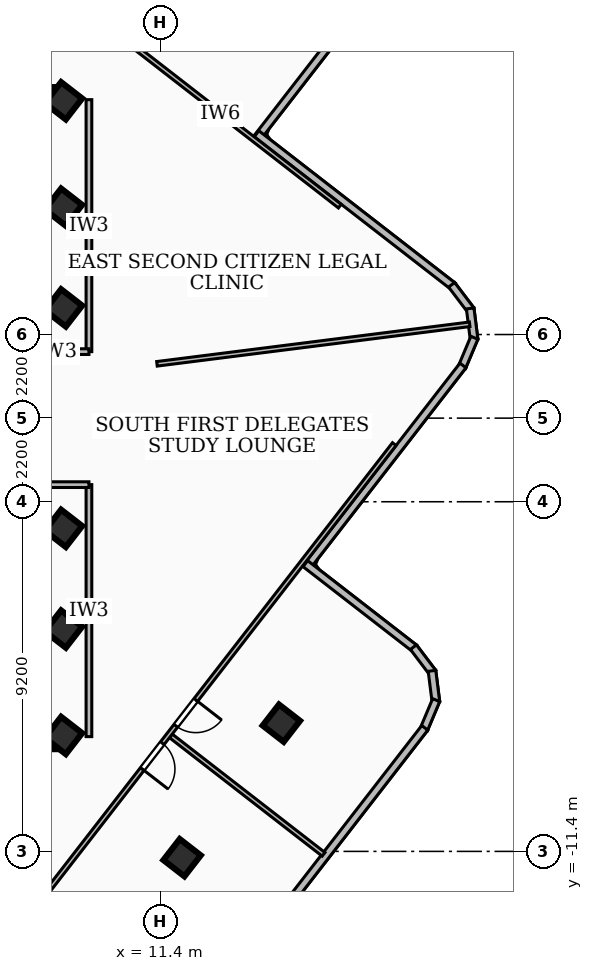
"""IFC4 building model, lengths in metres.
Left out: names, types, materials, properties, quantities, classifications, styles, units other than length and angle.
Written with IfcOpenShell. Run it as: python <this file> out.ifc"""

import sys

from ifc_helpers import new_model, si_unit, direction, frame, frame_2d, origin, origin_2d, place, context, subcontext, project, spatial, rectangle, extrude, element, fill, save


model = new_model("IFC4")
c1 = context("Model", 3, precision=1e-05, world=origin(), true_north=direction((0.0, 1.0)))
c2 = subcontext(c1, "Body", "Model", "MODEL_VIEW")
j1 = project(units=[si_unit("LENGTHUNIT", "METRE"), si_unit("PLANEANGLEUNIT", "RADIAN")], contexts=[c1])
p1 = place(None, origin())
s1 = spatial("IfcSite", under=j1, at=p1, CompositionType="ELEMENT")
p2 = place(p1, origin())
s2 = spatial("IfcBuilding", under=s1, at=p2, CompositionType="ELEMENT")
p3 = place(p2, frame((0.0, 0.0, 257.76)))
s3 = spatial("IfcBuildingStorey", under=s2, at=p3, CompositionType="ELEMENT", Elevation=257.76)
for number, where, z_axis, x_axis in (
    (1, (-8.78, 8.51, 0.0), (0.0, 0.0, 1.0), (1.0, 0.0, 0.0)),
    (2, (8.78, -8.51, 0.0), (0.0, 0.0, 1.0), (-1.0, 0.0, 0.0)),
):
    element("IfcWall", number, at=place(p3, frame(where, z_axis=z_axis, x_axis=x_axis)), inside=s3, PredefinedType="SHEAR", context=c2, shape_type="SweptSolid", body=[
        extrude(rectangle(XDim=17.56, YDim=0.4, at=frame_2d((8.78, 0.0))), origin(), (0.0, 0.0, 1.0), 3.16),
    ])
for number, where, z_axis, x_axis in (
    (3, (8.85, -5.55, 0.0), (0.0, 0.0, 1.0), (0.613, 0.79, 0.0)),
    (4, (8.85, -2.9, 0.0), (0.0, 0.0, 1.0), (0.613, 0.79, 0.0)),
    (5, (8.85, 2.9, 0.0), (0.0, 0.0, 1.0), (0.613, 0.79, 0.0)),
    (6, (8.85, 5.55, 0.0), (0.0, 0.0, 1.0), (0.613, 0.79, 0.0)),
    (7, (8.85, -8.35, 0.0), (0.0, 0.0, 1.0), (0.613, 0.79, 0.0)),
    (8, (8.85, 8.35, 0.0), (0.0, 0.0, 1.0), (0.613, 0.79, 0.0)),
    (9, (11.971, -11.566, 0.0), (0.0, 0.0, 1.0), (0.613, 0.79, 0.0)),
    (10, (14.583, -8.026, 0.0), (0.0, 0.0, 1.0), (0.613, 0.79, 0.0)),
):
    element("IfcColumn", number, at=place(p3, frame(where, z_axis=z_axis, x_axis=x_axis)), inside=s3, PredefinedType="COLUMN", context=c2, shape_type="SweptSolid", body=[
        extrude(rectangle(XDim=0.7, YDim=0.7, at=origin_2d()), origin(), (0.0, 0.0, 1.0), 3.42),
    ])
p4 = place(p3, frame((18.995, 13.883, 0.0), z_axis=(0.0, 0.0, 1.0), x_axis=(-0.612894114019, -0.790165049215, 0.0)))
e11 = element("IfcWall", 11, at=p4, inside=s3, PredefinedType="SOLIDWALL", context=c2, shape_type="SweptSolid", body=[
    extrude(rectangle(XDim=8.241, YDim=0.2, at=frame_2d((4.121, 0.0))), origin(), (0.0, 0.0, 1.0), 3.16),
])
p5 = place(p4, frame((0.85, 0.0, 0.85)))
e12 = element("IfcOpeningElement", 12, at=p5, cuts=e11, PredefinedType="OPENING", context=c2, shape_type="SweptSolid", body=[
    extrude(rectangle(XDim=2.4, YDim=1.65, at=frame_2d((1.2, 0.825))), frame((0.0, 0.11, 0.0), z_axis=(0.0, -1.0, 0.0), x_axis=(1.0, 0.0, 0.0)), (0.0, 0.0, 1.0), 0.22),
])
p6 = place(p3, frame((13.93, 7.483, 0.0), z_axis=(0.0, 0.0, 1.0), x_axis=(0.790217588081, -0.612826373036, 0.0)))
e13 = element("IfcWall", 13, at=p6, inside=s3, PredefinedType="SOLIDWALL", context=c2, shape_type="SweptSolid", body=[
    extrude(rectangle(XDim=6.542, YDim=0.2, at=frame_2d((3.271, 0.0))), origin(), (0.0, 0.0, 1.0), 3.16),
])
p7 = place(p3, frame((19.064, 3.509, 0.0), z_axis=(0.0, 0.0, 1.0), x_axis=(0.603908166539, -0.797053904317, 0.0)))
e14 = element("IfcWall", 14, at=p7, inside=s3, PredefinedType="SOLIDWALL", context=c2, shape_type="SweptSolid", body=[
    extrude(rectangle(XDim=0.838, YDim=0.2, at=frame_2d((0.419, 0.0))), origin(), (0.0, 0.0, 1.0), 3.16),
])
p8 = place(p3, frame((19.552, 2.886, 0.0), z_axis=(0.0, 0.0, 1.0), x_axis=(0.124799052175, -0.992182038023, 0.0)))
e15 = element("IfcWall", 15, at=p8, inside=s3, PredefinedType="SOLIDWALL", context=c2, shape_type="SweptSolid", body=[
    extrude(rectangle(XDim=0.825, YDim=0.2, at=frame_2d((0.413, 0.0))), origin(), (0.0, 0.0, 1.0), 3.16),
])
p9 = place(p3, frame((19.662, 2.115, 0.0), z_axis=(0.0, 0.0, 1.0), x_axis=(-0.388213349612, -0.921569528133, 0.0)))
e16 = element("IfcWall", 16, at=p9, inside=s3, PredefinedType="SOLIDWALL", context=c2, shape_type="SweptSolid", body=[
    extrude(rectangle(XDim=0.838, YDim=0.2, at=frame_2d((0.419, 0.0))), origin(), (0.0, 0.0, 1.0), 3.16),
])
p10 = place(p3, frame((19.362, 1.386, 0.0), z_axis=(0.0, 0.0, 1.0), x_axis=(-0.613007625303, -0.790076990755, 0.0)))
e17 = element("IfcWall", 17, at=p10, inside=s3, PredefinedType="SOLIDWALL", context=c2, shape_type="SweptSolid", body=[
    extrude(rectangle(XDim=6.742, YDim=0.2, at=frame_2d((3.371, 0.0))), origin(), (0.0, 0.0, 1.0), 3.16),
])
p11 = place(p3, frame((15.215, -3.829, 0.0), z_axis=(0.0, 0.0, 1.0), x_axis=(0.790311198889, -0.612705646221, 0.0)))
e18 = element("IfcWall", 18, at=p11, inside=s3, PredefinedType="SOLIDWALL", context=c2, shape_type="SweptSolid", body=[
    extrude(rectangle(XDim=3.643, YDim=0.2, at=frame_2d((1.821, 0.0))), origin(), (0.0, 0.0, 1.0), 3.16),
])
p12 = place(p3, frame((18.059, -6.026, 0.0), z_axis=(0.0, 0.0, 1.0), x_axis=(0.603582833373, -0.797300296787, 0.0)))
e19 = element("IfcWall", 19, at=p12, inside=s3, PredefinedType="SOLIDWALL", context=c2, shape_type="SweptSolid", body=[
    extrude(rectangle(XDim=0.838, YDim=0.2, at=frame_2d((0.419, 0.0))), origin(), (0.0, 0.0, 1.0), 3.16),
])
p13 = place(p3, frame((18.547, -6.649, 0.0), z_axis=(0.0, 0.0, 1.0), x_axis=(0.124507909692, -0.992218615238, 0.0)))
e20 = element("IfcWall", 20, at=p13, inside=s3, PredefinedType="SOLIDWALL", context=c2, shape_type="SweptSolid", body=[
    extrude(rectangle(XDim=0.825, YDim=0.2, at=frame_2d((0.413, 0.0))), origin(), (0.0, 0.0, 1.0), 3.16),
])
p14 = place(p3, frame((18.657, -7.42, 0.0), z_axis=(0.0, 0.0, 1.0), x_axis=(-0.387965780676, -0.921673777985, 0.0)))
e21 = element("IfcWall", 21, at=p14, inside=s3, PredefinedType="SOLIDWALL", context=c2, shape_type="SweptSolid", body=[
    extrude(rectangle(XDim=0.838, YDim=0.2, at=frame_2d((0.419, 0.0))), origin(), (0.0, 0.0, 1.0), 3.16),
])
p15 = place(p3, frame((18.357, -8.149, 0.0), z_axis=(0.0, 0.0, 1.0), x_axis=(-0.612797548915, -0.790239940806, 0.0)))
e22 = element("IfcWall", 22, at=p15, inside=s3, PredefinedType="SOLIDWALL", context=c2, shape_type="SweptSolid", body=[
    extrude(rectangle(XDim=9.824, YDim=0.2, at=frame_2d((4.912, 0.0))), origin(), (0.0, 0.0, 1.0), 3.16),
])
p16 = place(p15, frame((6.462, 0.0, 0.85)))
e23 = element("IfcOpeningElement", 23, at=p16, cuts=e22, PredefinedType="OPENING", context=c2, shape_type="SweptSolid", body=[
    extrude(rectangle(XDim=2.4, YDim=1.65, at=frame_2d((1.2, 0.825))), frame((0.0, 0.11, 0.0), z_axis=(0.0, -1.0, 0.0), x_axis=(1.0, 0.0, 0.0)), (0.0, 0.0, 1.0), 0.22),
])
p17 = place(p3, frame((9.52, 1.75, 0.0), z_axis=(0.0, 0.0, 1.0), x_axis=(0.0, 1.0, 0.0)))
e24 = element("IfcWall", 24, at=p17, inside=s3, PredefinedType="PARTITIONING", context=c2, shape_type="SweptSolid", body=[
    extrude(rectangle(XDim=6.63, YDim=0.15, at=frame_2d((3.315, 0.0))), origin(), (0.0, 0.0, 1.0), 3.16),
])
p18 = place(p3, frame((7.85, 1.75, 0.0), z_axis=(0.0, 0.0, 1.0), x_axis=(1.0, 0.0, 0.0)))
e25 = element("IfcWall", 25, at=p18, inside=s3, PredefinedType="PARTITIONING", context=c2, shape_type="SweptSolid", body=[
    extrude(rectangle(XDim=1.67, YDim=0.15, at=frame_2d((0.835, 0.0))), origin(), (0.0, 0.0, 1.0), 2.39),
])
p19 = place(p3, frame((9.52, -8.38, 0.0), z_axis=(0.0, 0.0, 1.0), x_axis=(0.0, 1.0, 0.0)))
e26 = element("IfcWall", 26, at=p19, inside=s3, PredefinedType="PARTITIONING", context=c2, shape_type="SweptSolid", body=[
    extrude(rectangle(XDim=6.63, YDim=0.15, at=frame_2d((3.315, 0.0))), origin(), (0.0, 0.0, 1.0), 2.53),
])
p20 = place(p3, frame((7.85, -1.75, 0.0), z_axis=(0.0, 0.0, 1.0), x_axis=(1.0, 0.0, 0.0)))
e27 = element("IfcWall", 27, at=p20, inside=s3, PredefinedType="PARTITIONING", context=c2, shape_type="SweptSolid", body=[
    extrude(rectangle(XDim=1.67, YDim=0.15, at=frame_2d((0.835, 0.0))), origin(), (0.0, 0.0, 1.0), 2.39),
])
p21 = place(p3, frame((11.31, 1.429, 0.0), z_axis=(0.0, 0.0, 1.0), x_axis=(0.992107592132, 0.125389495712, 0.0)))
e28 = element("IfcWall", 28, at=p21, inside=s3, PredefinedType="PARTITIONING", context=c2, shape_type="SweptSolid", body=[
    extrude(rectangle(XDim=8.294, YDim=0.12, at=frame_2d((4.147, 0.0))), origin(), (0.0, 0.0, 1.0), 3.16),
])
p22 = place(p3, frame((16.122, 5.578, 0.0), z_axis=(0.0, 0.0, 1.0), x_axis=(-0.7900346363, 0.613062210094, 0.0)))
e29 = element("IfcWall", 29, at=p22, inside=s3, PredefinedType="PARTITIONING", context=c2, shape_type="SweptSolid", body=[
    extrude(rectangle(XDim=7.95, YDim=0.12, at=frame_2d((3.975, 0.0))), origin(), (0.0, 0.0, 1.0), 2.53),
])
p23 = place(p3, frame((11.676, -8.361, 0.0), z_axis=(0.0, 0.0, 1.0), x_axis=(0.790227868115, -0.612813117071, 0.0)))
e30 = element("IfcWall", 30, at=p23, inside=s3, PredefinedType="PARTITIONING", context=c2, shape_type="SweptSolid", body=[
    extrude(rectangle(XDim=5.085, YDim=0.12, at=frame_2d((2.542, 0.0))), origin(), (0.0, 0.0, 1.0), 3.16),
])
p24 = place(p3, frame((17.555, -0.683, 0.0), z_axis=(0.0, 0.0, 1.0), x_axis=(-0.61291959311, -0.790145285617, 0.0)))
e31 = element("IfcWall", 31, at=p24, inside=s3, PredefinedType="PARTITIONING", context=c2, shape_type="SweptSolid", body=[
    extrude(rectangle(XDim=20.239, YDim=0.12, at=frame_2d((10.12, 0.0))), origin(), (0.0, 0.0, 1.0), 2.53),
])
p25 = place(p24, frame((9.96, 0.0, 0.0)))
e32 = element("IfcOpeningElement", 32, at=p25, cuts=e31, PredefinedType="OPENING", context=c2, shape_type="SweptSolid", body=[
    extrude(rectangle(XDim=0.86, YDim=2.04, at=frame_2d((0.43, 1.02))), frame((0.0, 0.07, 0.0), z_axis=(0.0, -1.0, 0.0), x_axis=(1.0, 0.0, 0.0)), (0.0, 0.0, 1.0), 0.14),
])
p26 = place(p24, frame((8.52, 0.0, 0.0)))
e33 = element("IfcOpeningElement", 33, at=p26, cuts=e31, PredefinedType="OPENING", context=c2, shape_type="SweptSolid", body=[
    extrude(rectangle(XDim=0.86, YDim=2.04, at=frame_2d((0.43, 1.02))), frame((0.0, 0.07, 0.0), z_axis=(0.0, -1.0, 0.0), x_axis=(1.0, 0.0, 0.0)), (0.0, 0.0, 1.0), 0.14),
])
p27 = place(p25, origin())
e34 = element("IfcDoor", 34, at=p27, inside=s3, OperationType="SINGLE_SWING_RIGHT", PredefinedType="DOOR", context=c2, shape_type="SweptSolid", body=[
    extrude(rectangle(XDim=0.86, YDim=2.04, at=frame_2d((0.43, 1.02))), frame((0.0, 0.025, 0.0), z_axis=(0.0, -1.0, 0.0), x_axis=(1.0, 0.0, 0.0)), (0.0, 0.0, 1.0), 0.05),
])
fill(e32, e34)
p28 = place(p26, origin())
e35 = element("IfcDoor", 35, at=p28, inside=s3, OperationType="SINGLE_SWING_LEFT", PredefinedType="DOOR", context=c2, shape_type="SweptSolid", body=[
    extrude(rectangle(XDim=0.86, YDim=2.04, at=frame_2d((0.43, 1.02))), frame((0.0, 0.025, 0.0), z_axis=(0.0, -1.0, 0.0), x_axis=(1.0, 0.0, 0.0)), (0.0, 0.0, 1.0), 0.05),
])
fill(e33, e35)
save(model, sys.argv[1])
